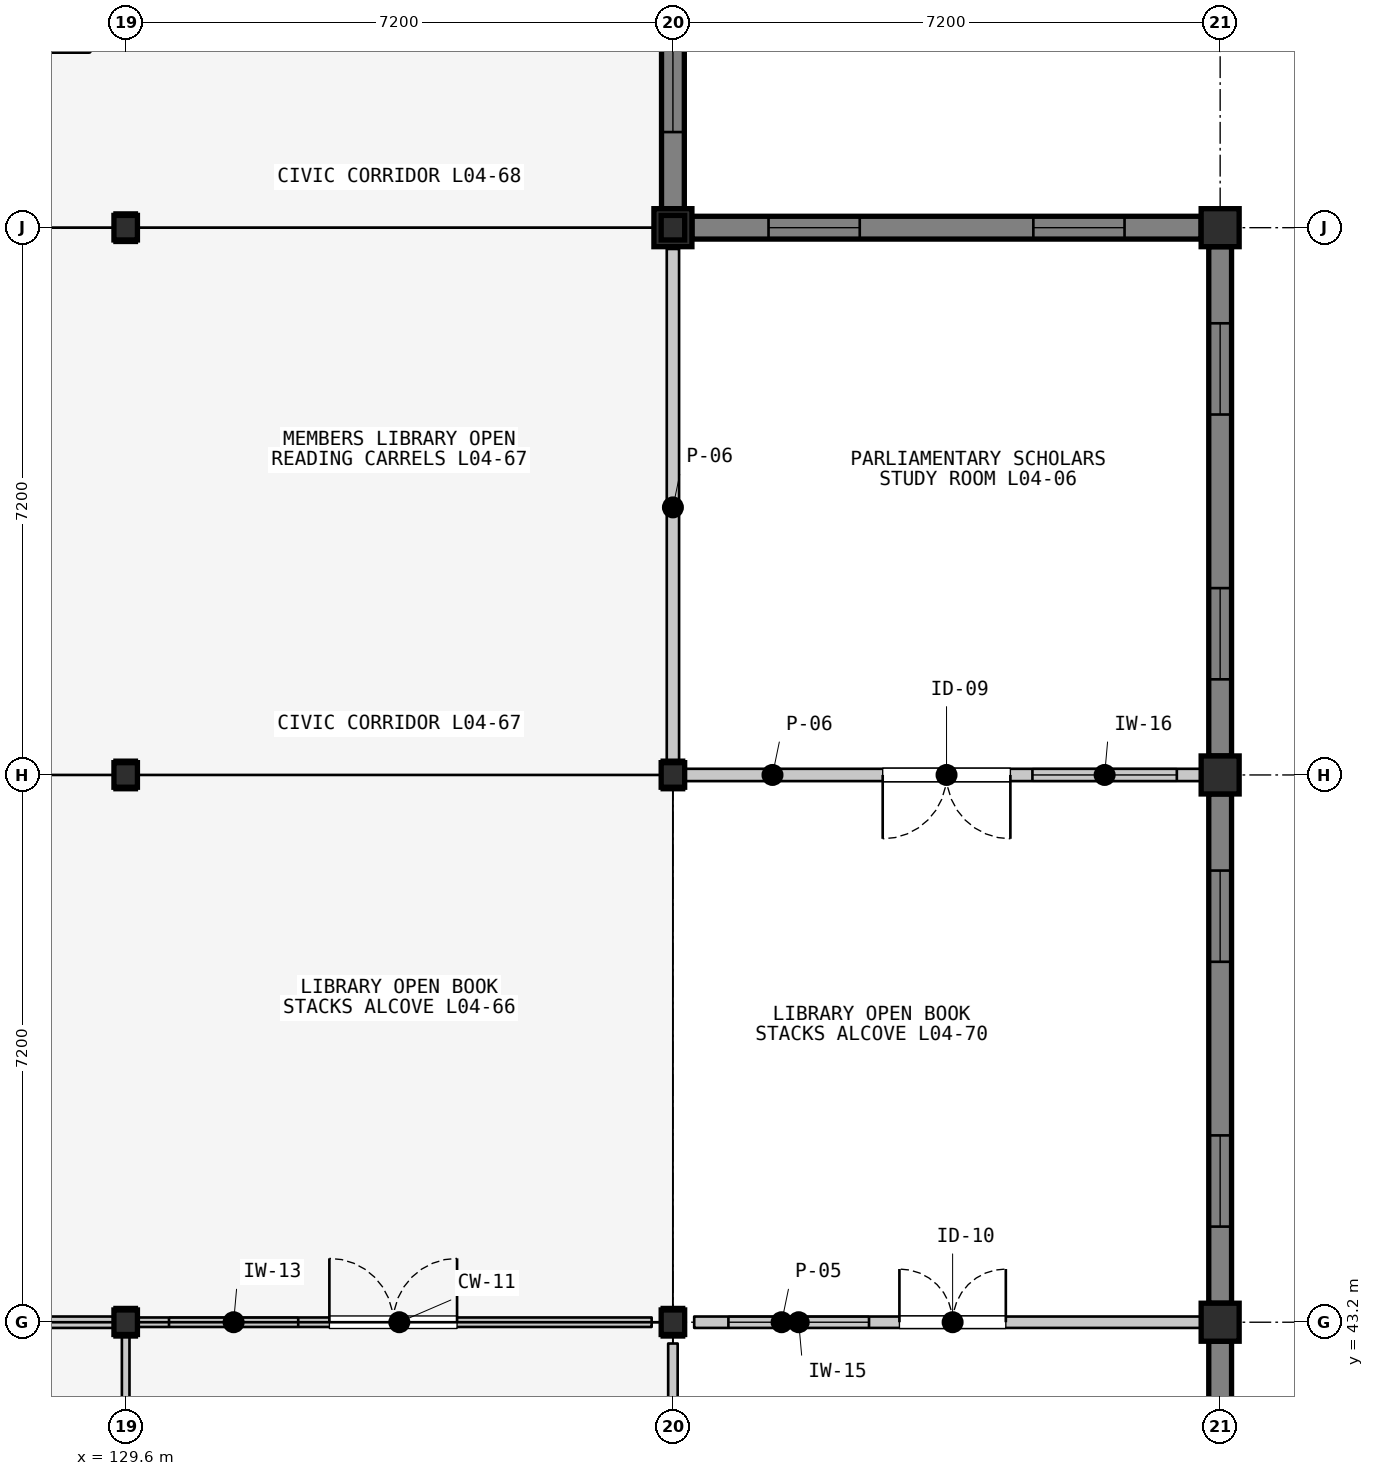
"""IFC4 building model, lengths in metres.
Left out: names, types, materials, properties, quantities, classifications, styles, units other than length and angle.
Written with IfcOpenShell. Run it as: python <this file> out.ifc"""

import sys

from ifc_helpers import new_model, si_unit, direction, frame, frame_2d, origin, origin_2d, place, context, subcontext, project, spatial, rectangle, i_section, extrude, element, fill, save


model = new_model("IFC4")
c1 = context("Model", 3, precision=1e-05, world=origin(), true_north=direction((0.0, 1.0)))
c2 = subcontext(c1, "Body", "Model", "MODEL_VIEW")
j1 = project(units=[si_unit("LENGTHUNIT", "METRE"), si_unit("PLANEANGLEUNIT", "RADIAN")], contexts=[c1])
p1 = place(None, origin())
s1 = spatial("IfcSite", under=j1, at=p1, CompositionType="ELEMENT")
p2 = place(p1, origin())
s2 = spatial("IfcBuilding", under=s1, at=p2, CompositionType="ELEMENT")
p3 = place(p2, frame((0.0, 0.0, 14.1)))
s3 = spatial("IfcBuildingStorey", under=s2, at=p3, CompositionType="ELEMENT", Elevation=14.1)
for number, where, z_axis, x_axis in (
    (1, (129.6, 43.2, 0.0), (0.0, 0.0, 1.0), (1.0, 0.0, 0.0)),
    (2, (129.6, 50.4, 0.0), (0.0, 0.0, 1.0), (1.0, 0.0, 0.0)),
    (3, (129.6, 57.6, 0.0), (0.0, 0.0, 1.0), (1.0, 0.0, 0.0)),
    (4, (136.8, 43.2, 0.0), (0.0, 0.0, 1.0), (1.0, 0.0, 0.0)),
    (5, (136.8, 50.4, 0.0), (0.0, 0.0, 1.0), (1.0, 0.0, 0.0)),
):
    element("IfcColumn", number, at=place(p3, frame(where, z_axis=z_axis, x_axis=x_axis)), inside=s3, PredefinedType="COLUMN", context=c2, shape_type="SweptSolid", body=[
        extrude(i_section(OverallWidth=0.257, OverallDepth=0.363, WebThickness=0.013, FlangeThickness=0.022, FilletRadius=0.015, at=origin_2d()), origin(), (0.0, 0.0, 1.0), 3.9),
    ])
for number, where, z_axis, x_axis in (
    (6, (136.8, 57.6, 0.0), (0.0, 0.0, 1.0), (1.0, 0.0, 0.0)),
    (7, (144.0, 43.2, 0.0), (0.0, 0.0, 1.0), (1.0, 0.0, 0.0)),
    (8, (144.0, 50.4, 0.0), (0.0, 0.0, 1.0), (1.0, 0.0, 0.0)),
    (9, (144.0, 57.6, 0.0), (0.0, 0.0, 1.0), (1.0, 0.0, 0.0)),
):
    element("IfcColumn", number, at=place(p3, frame(where, z_axis=z_axis, x_axis=x_axis)), inside=s3, PredefinedType="COLUMN", context=c2, shape_type="SweptSolid", body=[
        extrude(rectangle(XDim=0.5, YDim=0.5, at=origin_2d()), origin(), (0.0, 0.0, 1.0), 3.9),
    ])
for number, where, z_axis, x_axis in (
    (10, (129.6, 43.2, 3.9), (0.0, 0.0, 1.0), (1.0, 0.0, 0.0)),
    (11, (136.8, 43.2, 3.9), (0.0, 0.0, 1.0), (1.0, 0.0, 0.0)),
    (12, (129.6, 50.4, 3.9), (0.0, 0.0, 1.0), (1.0, 0.0, 0.0)),
    (13, (136.8, 50.4, 3.9), (0.0, 0.0, 1.0), (1.0, 0.0, 0.0)),
    (14, (129.6, 57.6, 3.9), (0.0, 0.0, 1.0), (1.0, 0.0, 0.0)),
    (15, (136.8, 57.6, 3.9), (0.0, 0.0, 1.0), (1.0, 0.0, 0.0)),
):
    element("IfcColumn", number, at=place(p3, frame(where, z_axis=z_axis, x_axis=x_axis)), inside=s3, PredefinedType="COLUMN", context=c2, shape_type="SweptSolid", body=[
        extrude(i_section(OverallWidth=0.309, OverallDepth=0.323, WebThickness=0.014, FlangeThickness=0.023, FilletRadius=0.015, at=origin_2d()), origin(), (0.0, 0.0, 1.0), 2.22),
    ])
p4 = place(p3, frame((136.8, 64.55, 0.0), z_axis=(0.0, 0.0, 1.0), x_axis=(0.0, -1.0, 0.0)))
e16 = element("IfcWall", 16, at=p4, inside=s3, PredefinedType="SOLIDWALL", context=c2, shape_type="SweptSolid", body=[
    extrude(rectangle(XDim=6.7, YDim=0.3, at=frame_2d((3.35, 0.0))), origin(), (0.0, 0.0, 1.0), 3.2),
])
p5 = place(p4, frame((1.008, 0.0, 0.95)))
e17 = element("IfcOpeningElement", 17, at=p5, cuts=e16, PredefinedType="OPENING", context=c2, shape_type="SweptSolid", body=[
    extrude(rectangle(XDim=1.2, YDim=1.7, at=frame_2d((0.6, 0.85))), frame((0.0, 0.16, 0.0), z_axis=(0.0, -1.0, 0.0), x_axis=(1.0, 0.0, 0.0)), (0.0, 0.0, 1.0), 0.32),
])
p6 = place(p4, frame((4.492, 0.0, 0.95)))
e18 = element("IfcOpeningElement", 18, at=p6, cuts=e16, PredefinedType="OPENING", context=c2, shape_type="SweptSolid", body=[
    extrude(rectangle(XDim=1.2, YDim=1.7, at=frame_2d((0.6, 0.85))), frame((0.0, 0.16, 0.0), z_axis=(0.0, -1.0, 0.0), x_axis=(1.0, 0.0, 0.0)), (0.0, 0.0, 1.0), 0.32),
])
p7 = place(p3, frame((144.0, 42.95, 0.0), z_axis=(0.0, 0.0, 1.0), x_axis=(0.0, -1.0, 0.0)))
e19 = element("IfcWall", 19, at=p7, inside=s3, PredefinedType="SOLIDWALL", context=c2, shape_type="SweptSolid", body=[
    extrude(rectangle(XDim=6.7, YDim=0.3, at=frame_2d((3.35, 0.0))), origin(), (0.0, 0.0, 1.0), 3.172),
])
p8 = place(p7, frame((1.008, 0.0, 0.95)))
e20 = element("IfcOpeningElement", 20, at=p8, cuts=e19, PredefinedType="OPENING", context=c2, shape_type="SweptSolid", body=[
    extrude(rectangle(XDim=1.2, YDim=1.7, at=frame_2d((0.6, 0.85))), frame((0.0, 0.16, 0.0), z_axis=(0.0, -1.0, 0.0), x_axis=(1.0, 0.0, 0.0)), (0.0, 0.0, 1.0), 0.32),
])
p9 = place(p7, frame((4.492, 0.0, 0.95)))
e21 = element("IfcOpeningElement", 21, at=p9, cuts=e19, PredefinedType="OPENING", context=c2, shape_type="SweptSolid", body=[
    extrude(rectangle(XDim=1.2, YDim=1.7, at=frame_2d((0.6, 0.85))), frame((0.0, 0.16, 0.0), z_axis=(0.0, -1.0, 0.0), x_axis=(1.0, 0.0, 0.0)), (0.0, 0.0, 1.0), 0.32),
])
p10 = place(p3, frame((144.0, 50.15, 0.0), z_axis=(0.0, 0.0, 1.0), x_axis=(0.0, -1.0, 0.0)))
e22 = element("IfcWall", 22, at=p10, inside=s3, PredefinedType="SOLIDWALL", context=c2, shape_type="SweptSolid", body=[
    extrude(rectangle(XDim=6.7, YDim=0.3, at=frame_2d((3.35, 0.0))), origin(), (0.0, 0.0, 1.0), 3.172),
])
p11 = place(p10, frame((1.008, 0.0, 0.95)))
e23 = element("IfcOpeningElement", 23, at=p11, cuts=e22, PredefinedType="OPENING", context=c2, shape_type="SweptSolid", body=[
    extrude(rectangle(XDim=1.2, YDim=1.7, at=frame_2d((0.6, 0.85))), frame((0.0, 0.16, 0.0), z_axis=(0.0, -1.0, 0.0), x_axis=(1.0, 0.0, 0.0)), (0.0, 0.0, 1.0), 0.32),
])
p12 = place(p10, frame((4.492, 0.0, 0.95)))
e24 = element("IfcOpeningElement", 24, at=p12, cuts=e22, PredefinedType="OPENING", context=c2, shape_type="SweptSolid", body=[
    extrude(rectangle(XDim=1.2, YDim=1.7, at=frame_2d((0.6, 0.85))), frame((0.0, 0.16, 0.0), z_axis=(0.0, -1.0, 0.0), x_axis=(1.0, 0.0, 0.0)), (0.0, 0.0, 1.0), 0.32),
])
p13 = place(p3, frame((137.05, 57.6, 0.0), z_axis=(0.0, 0.0, 1.0), x_axis=(1.0, 0.0, 0.0)))
e25 = element("IfcWall", 25, at=p13, inside=s3, PredefinedType="SOLIDWALL", context=c2, shape_type="SweptSolid", body=[
    extrude(rectangle(XDim=6.7, YDim=0.3, at=frame_2d((3.35, 0.0))), origin(), (0.0, 0.0, 1.0), 3.098),
])
p14 = place(p13, frame((1.008, 0.0, 0.95)))
e26 = element("IfcOpeningElement", 26, at=p14, cuts=e25, PredefinedType="OPENING", context=c2, shape_type="SweptSolid", body=[
    extrude(rectangle(XDim=1.2, YDim=1.7, at=frame_2d((0.6, 0.85))), frame((0.0, 0.16, 0.0), z_axis=(0.0, -1.0, 0.0), x_axis=(1.0, 0.0, 0.0)), (0.0, 0.0, 1.0), 0.32),
])
p15 = place(p13, frame((4.492, 0.0, 0.95)))
e27 = element("IfcOpeningElement", 27, at=p15, cuts=e25, PredefinedType="OPENING", context=c2, shape_type="SweptSolid", body=[
    extrude(rectangle(XDim=1.2, YDim=1.7, at=frame_2d((0.6, 0.85))), frame((0.0, 0.16, 0.0), z_axis=(0.0, -1.0, 0.0), x_axis=(1.0, 0.0, 0.0)), (0.0, 0.0, 1.0), 0.32),
])
p16 = place(p3, frame((144.0, 57.35, 0.0), z_axis=(0.0, 0.0, 1.0), x_axis=(0.0, -1.0, 0.0)))
e28 = element("IfcWall", 28, at=p16, inside=s3, PredefinedType="SOLIDWALL", context=c2, shape_type="SweptSolid", body=[
    extrude(rectangle(XDim=6.7, YDim=0.3, at=frame_2d((3.35, 0.0))), origin(), (0.0, 0.0, 1.0), 3.172),
])
p17 = place(p16, frame((1.008, 0.0, 0.95)))
e29 = element("IfcOpeningElement", 29, at=p17, cuts=e28, PredefinedType="OPENING", context=c2, shape_type="SweptSolid", body=[
    extrude(rectangle(XDim=1.2, YDim=1.7, at=frame_2d((0.6, 0.85))), frame((0.0, 0.16, 0.0), z_axis=(0.0, -1.0, 0.0), x_axis=(1.0, 0.0, 0.0)), (0.0, 0.0, 1.0), 0.32),
])
p18 = place(p16, frame((4.492, 0.0, 0.95)))
e30 = element("IfcOpeningElement", 30, at=p18, cuts=e28, PredefinedType="OPENING", context=c2, shape_type="SweptSolid", body=[
    extrude(rectangle(XDim=1.2, YDim=1.7, at=frame_2d((0.6, 0.85))), frame((0.0, 0.16, 0.0), z_axis=(0.0, -1.0, 0.0), x_axis=(1.0, 0.0, 0.0)), (0.0, 0.0, 1.0), 0.32),
])
p19 = place(p3, frame((122.68, 43.2, 0.0), z_axis=(0.0, 0.0, 1.0), x_axis=(1.0, 0.0, 0.0)))
e31 = element("IfcWall", 31, at=p19, inside=s3, PredefinedType="PARTITIONING", context=c2, shape_type="SweptSolid", body=[
    extrude(rectangle(XDim=6.8, YDim=0.15, at=frame_2d((3.4, 0.0))), origin(), (0.0, 0.0, 1.0), 3.19),
])
p20 = place(p19, frame((2.56, 0.0, 0.0)))
e32 = element("IfcOpeningElement", 32, at=p20, cuts=e31, PredefinedType="OPENING", context=c2, shape_type="SweptSolid", body=[
    extrude(rectangle(XDim=1.68, YDim=2.35, at=frame_2d((0.84, 1.175))), frame((0.0, 0.085, 0.0), z_axis=(0.0, -1.0, 0.0), x_axis=(1.0, 0.0, 0.0)), (0.0, 0.0, 1.0), 0.17),
])
p21 = place(p19, frame((0.45, 0.0, 1.05)))
e33 = element("IfcOpeningElement", 33, at=p21, cuts=e31, PredefinedType="OPENING", context=c2, shape_type="SweptSolid", body=[
    extrude(rectangle(XDim=1.55, YDim=1.15, at=frame_2d((0.775, 0.575))), frame((0.0, 0.085, 0.0), z_axis=(0.0, -1.0, 0.0), x_axis=(1.0, 0.0, 0.0)), (0.0, 0.0, 1.0), 0.17),
])
p22 = place(p3, frame((129.6, 43.08, 0.0), z_axis=(0.0, 0.0, 1.0), x_axis=(0.0, -1.0, 0.0)))
e34 = element("IfcWall", 34, at=p22, inside=s3, PredefinedType="PARTITIONING", context=c2, shape_type="SweptSolid", body=[
    extrude(rectangle(XDim=6.96, YDim=0.1, at=frame_2d((3.48, 0.0))), origin(), (0.0, 0.0, 1.0), 3.19),
])
p23 = place(p3, frame((129.72, 43.2, 0.0), z_axis=(0.0, 0.0, 1.0), x_axis=(1.0, 0.0, 0.0)))
e35 = element("IfcWall", 35, at=p23, inside=s3, PredefinedType="PARTITIONING", context=c2, shape_type="SweptSolid", body=[
    extrude(rectangle(XDim=6.8, YDim=0.125, at=frame_2d((3.4, 0.0))), origin(), (0.0, 0.0, 1.0), 3.19),
])
p24 = place(p23, frame((2.56, 0.0, 0.0)))
e36 = element("IfcOpeningElement", 36, at=p24, cuts=e35, PredefinedType="OPENING", context=c2, shape_type="SweptSolid", body=[
    extrude(rectangle(XDim=1.68, YDim=2.35, at=frame_2d((0.84, 1.175))), frame((0.0, 0.073, 0.0), z_axis=(0.0, -1.0, 0.0), x_axis=(1.0, 0.0, 0.0)), (0.0, 0.0, 1.0), 0.145),
])
p25 = place(p23, frame((0.45, 0.0, 1.05)))
e37 = element("IfcOpeningElement", 37, at=p25, cuts=e35, PredefinedType="OPENING", context=c2, shape_type="SweptSolid", body=[
    extrude(rectangle(XDim=1.7, YDim=1.18, at=frame_2d((0.85, 0.59))), frame((0.0, 0.073, 0.0), z_axis=(0.0, -1.0, 0.0), x_axis=(1.0, 0.0, 0.0)), (0.0, 0.0, 1.0), 0.145),
])
p26 = place(p3, frame((136.8, 42.92, 0.0), z_axis=(0.0, 0.0, 1.0), x_axis=(0.0, -1.0, 0.0)))
e38 = element("IfcWall", 38, at=p26, inside=s3, PredefinedType="PARTITIONING", context=c2, shape_type="SweptSolid", body=[
    extrude(rectangle(XDim=6.8, YDim=0.125, at=frame_2d((3.4, 0.0))), origin(), (0.0, 0.0, 1.0), 3.088),
])
p27 = place(p3, frame((137.08, 43.2, 0.0), z_axis=(0.0, 0.0, 1.0), x_axis=(1.0, 0.0, 0.0)))
e39 = element("IfcWall", 39, at=p27, inside=s3, PredefinedType="PARTITIONING", context=c2, shape_type="SweptSolid", body=[
    extrude(rectangle(XDim=6.8, YDim=0.15, at=frame_2d((3.4, 0.0))), origin(), (0.0, 0.0, 1.0), 3.088),
])
p28 = place(p27, frame((2.7, 0.0, 0.0)))
e40 = element("IfcOpeningElement", 40, at=p28, cuts=e39, PredefinedType="OPENING", context=c2, shape_type="SweptSolid", body=[
    extrude(rectangle(XDim=1.4, YDim=2.25, at=frame_2d((0.7, 1.125))), frame((0.0, 0.085, 0.0), z_axis=(0.0, -1.0, 0.0), x_axis=(1.0, 0.0, 0.0)), (0.0, 0.0, 1.0), 0.17),
])
p29 = place(p27, frame((0.45, 0.0, 1.05)))
e41 = element("IfcOpeningElement", 41, at=p29, cuts=e39, PredefinedType="OPENING", context=c2, shape_type="SweptSolid", body=[
    extrude(rectangle(XDim=1.85, YDim=1.18, at=frame_2d((0.925, 0.59))), frame((0.0, 0.085, 0.0), z_axis=(0.0, -1.0, 0.0), x_axis=(1.0, 0.0, 0.0)), (0.0, 0.0, 1.0), 0.17),
])
p30 = place(p3, frame((143.88, 50.4, 0.0), z_axis=(0.0, 0.0, 1.0), x_axis=(-1.0, 0.0, 0.0)))
e42 = element("IfcWall", 42, at=p30, inside=s3, PredefinedType="PARTITIONING", context=c2, shape_type="SweptSolid", body=[
    extrude(rectangle(XDim=6.96, YDim=0.162, at=frame_2d((3.48, 0.0))), origin(), (0.0, 0.0, 1.0), 3.088),
])
p31 = place(p30, frame((2.64, 0.0, 0.0)))
e43 = element("IfcOpeningElement", 43, at=p31, cuts=e42, PredefinedType="OPENING", context=c2, shape_type="SweptSolid", body=[
    extrude(rectangle(XDim=1.68, YDim=2.35, at=frame_2d((0.84, 1.175))), frame((0.0, 0.091, 0.0), z_axis=(0.0, -1.0, 0.0), x_axis=(1.0, 0.0, 0.0)), (0.0, 0.0, 1.0), 0.182),
])
p32 = place(p30, frame((0.45, 0.0, 1.05)))
e44 = element("IfcOpeningElement", 44, at=p32, cuts=e42, PredefinedType="OPENING", context=c2, shape_type="SweptSolid", body=[
    extrude(rectangle(XDim=1.9, YDim=1.22, at=frame_2d((0.95, 0.61))), frame((0.0, 0.091, 0.0), z_axis=(0.0, -1.0, 0.0), x_axis=(1.0, 0.0, 0.0)), (0.0, 0.0, 1.0), 0.182),
])
p33 = place(p3, frame((136.8, 50.52, 0.0), z_axis=(0.0, 0.0, 1.0), x_axis=(0.0, 1.0, 0.0)))
e45 = element("IfcWall", 45, at=p33, inside=s3, PredefinedType="PARTITIONING", context=c2, shape_type="SweptSolid", body=[
    extrude(rectangle(XDim=6.8, YDim=0.162, at=frame_2d((3.4, 0.0))), origin(), (0.0, 0.0, 1.0), 3.088),
])
p34 = place(p6, origin())
e46 = element("IfcWindow", 46, at=p34, inside=s3, PartitioningType="SINGLE_PANEL", PredefinedType="WINDOW", context=c2, shape_type="SweptSolid", body=[
    extrude(rectangle(XDim=1.2, YDim=1.7, at=frame_2d((0.6, 0.85))), frame((0.0, 0.03, 0.0), z_axis=(0.0, -1.0, 0.0), x_axis=(1.0, 0.0, 0.0)), (0.0, 0.0, 1.0), 0.06),
])
fill(e18, e46)
p35 = place(p11, origin())
e47 = element("IfcWindow", 47, at=p35, inside=s3, PartitioningType="SINGLE_PANEL", PredefinedType="WINDOW", context=c2, shape_type="SweptSolid", body=[
    extrude(rectangle(XDim=1.2, YDim=1.7, at=frame_2d((0.6, 0.85))), frame((0.0, 0.03, 0.0), z_axis=(0.0, -1.0, 0.0), x_axis=(1.0, 0.0, 0.0)), (0.0, 0.0, 1.0), 0.06),
])
fill(e23, e47)
p36 = place(p12, origin())
e48 = element("IfcWindow", 48, at=p36, inside=s3, PartitioningType="SINGLE_PANEL", PredefinedType="WINDOW", context=c2, shape_type="SweptSolid", body=[
    extrude(rectangle(XDim=1.2, YDim=1.7, at=frame_2d((0.6, 0.85))), frame((0.0, 0.03, 0.0), z_axis=(0.0, -1.0, 0.0), x_axis=(1.0, 0.0, 0.0)), (0.0, 0.0, 1.0), 0.06),
])
fill(e24, e48)
p37 = place(p14, origin())
e49 = element("IfcWindow", 49, at=p37, inside=s3, PartitioningType="SINGLE_PANEL", PredefinedType="WINDOW", context=c2, shape_type="SweptSolid", body=[
    extrude(rectangle(XDim=1.2, YDim=1.7, at=frame_2d((0.6, 0.85))), frame((0.0, 0.03, 0.0), z_axis=(0.0, -1.0, 0.0), x_axis=(1.0, 0.0, 0.0)), (0.0, 0.0, 1.0), 0.06),
])
fill(e26, e49)
p38 = place(p15, origin())
e50 = element("IfcWindow", 50, at=p38, inside=s3, PartitioningType="SINGLE_PANEL", PredefinedType="WINDOW", context=c2, shape_type="SweptSolid", body=[
    extrude(rectangle(XDim=1.2, YDim=1.7, at=frame_2d((0.6, 0.85))), frame((0.0, 0.03, 0.0), z_axis=(0.0, -1.0, 0.0), x_axis=(1.0, 0.0, 0.0)), (0.0, 0.0, 1.0), 0.06),
])
fill(e27, e50)
p39 = place(p17, origin())
e51 = element("IfcWindow", 51, at=p39, inside=s3, PartitioningType="SINGLE_PANEL", PredefinedType="WINDOW", context=c2, shape_type="SweptSolid", body=[
    extrude(rectangle(XDim=1.2, YDim=1.7, at=frame_2d((0.6, 0.85))), frame((0.0, 0.03, 0.0), z_axis=(0.0, -1.0, 0.0), x_axis=(1.0, 0.0, 0.0)), (0.0, 0.0, 1.0), 0.06),
])
fill(e29, e51)
p40 = place(p18, origin())
e52 = element("IfcWindow", 52, at=p40, inside=s3, PartitioningType="SINGLE_PANEL", PredefinedType="WINDOW", context=c2, shape_type="SweptSolid", body=[
    extrude(rectangle(XDim=1.2, YDim=1.7, at=frame_2d((0.6, 0.85))), frame((0.0, 0.03, 0.0), z_axis=(0.0, -1.0, 0.0), x_axis=(1.0, 0.0, 0.0)), (0.0, 0.0, 1.0), 0.06),
])
fill(e30, e52)
p41 = place(p24, origin())
e53 = element("IfcDoor", 53, at=p41, inside=s3, OperationType="DOUBLE_DOOR_SINGLE_SWING", PredefinedType="DOOR", context=c2, shape_type="SweptSolid", body=[
    extrude(rectangle(XDim=1.68, YDim=2.35, at=frame_2d((0.84, 1.175))), frame((0.0, 0.025, 0.0), z_axis=(0.0, -1.0, 0.0), x_axis=(1.0, 0.0, 0.0)), (0.0, 0.0, 1.0), 0.05),
])
fill(e36, e53)
p42 = place(p25, origin())
e54 = element("IfcWindow", 54, at=p42, inside=s3, PartitioningType="SINGLE_PANEL", PredefinedType="WINDOW", context=c2, shape_type="SweptSolid", body=[
    extrude(rectangle(XDim=1.7, YDim=1.18, at=frame_2d((0.85, 0.59))), frame((0.0, 0.03, 0.0), z_axis=(0.0, -1.0, 0.0), x_axis=(1.0, 0.0, 0.0)), (0.0, 0.0, 1.0), 0.06),
])
fill(e37, e54)
p43 = place(p28, origin())
e55 = element("IfcDoor", 55, at=p43, inside=s3, OperationType="DOUBLE_DOOR_SINGLE_SWING", PredefinedType="DOOR", context=c2, shape_type="SweptSolid", body=[
    extrude(rectangle(XDim=1.4, YDim=2.25, at=frame_2d((0.7, 1.125))), frame((0.0, 0.025, 0.0), z_axis=(0.0, -1.0, 0.0), x_axis=(1.0, 0.0, 0.0)), (0.0, 0.0, 1.0), 0.05),
])
fill(e40, e55)
p44 = place(p29, origin())
e56 = element("IfcWindow", 56, at=p44, inside=s3, PartitioningType="SINGLE_PANEL", PredefinedType="WINDOW", context=c2, shape_type="SweptSolid", body=[
    extrude(rectangle(XDim=1.85, YDim=1.18, at=frame_2d((0.925, 0.59))), frame((0.0, 0.03, 0.0), z_axis=(0.0, -1.0, 0.0), x_axis=(1.0, 0.0, 0.0)), (0.0, 0.0, 1.0), 0.06),
])
fill(e41, e56)
p45 = place(p31, origin())
e57 = element("IfcDoor", 57, at=p45, inside=s3, OperationType="DOUBLE_DOOR_SINGLE_SWING", PredefinedType="DOOR", context=c2, shape_type="SweptSolid", body=[
    extrude(rectangle(XDim=1.68, YDim=2.35, at=frame_2d((0.84, 1.175))), frame((0.0, 0.025, 0.0), z_axis=(0.0, -1.0, 0.0), x_axis=(1.0, 0.0, 0.0)), (0.0, 0.0, 1.0), 0.05),
])
fill(e43, e57)
p46 = place(p32, origin())
e58 = element("IfcWindow", 58, at=p46, inside=s3, PartitioningType="SINGLE_PANEL", PredefinedType="WINDOW", context=c2, shape_type="SweptSolid", body=[
    extrude(rectangle(XDim=1.9, YDim=1.22, at=frame_2d((0.95, 0.61))), frame((0.0, 0.03, 0.0), z_axis=(0.0, -1.0, 0.0), x_axis=(1.0, 0.0, 0.0)), (0.0, 0.0, 1.0), 0.06),
])
fill(e44, e58)
save(model, sys.argv[1])
